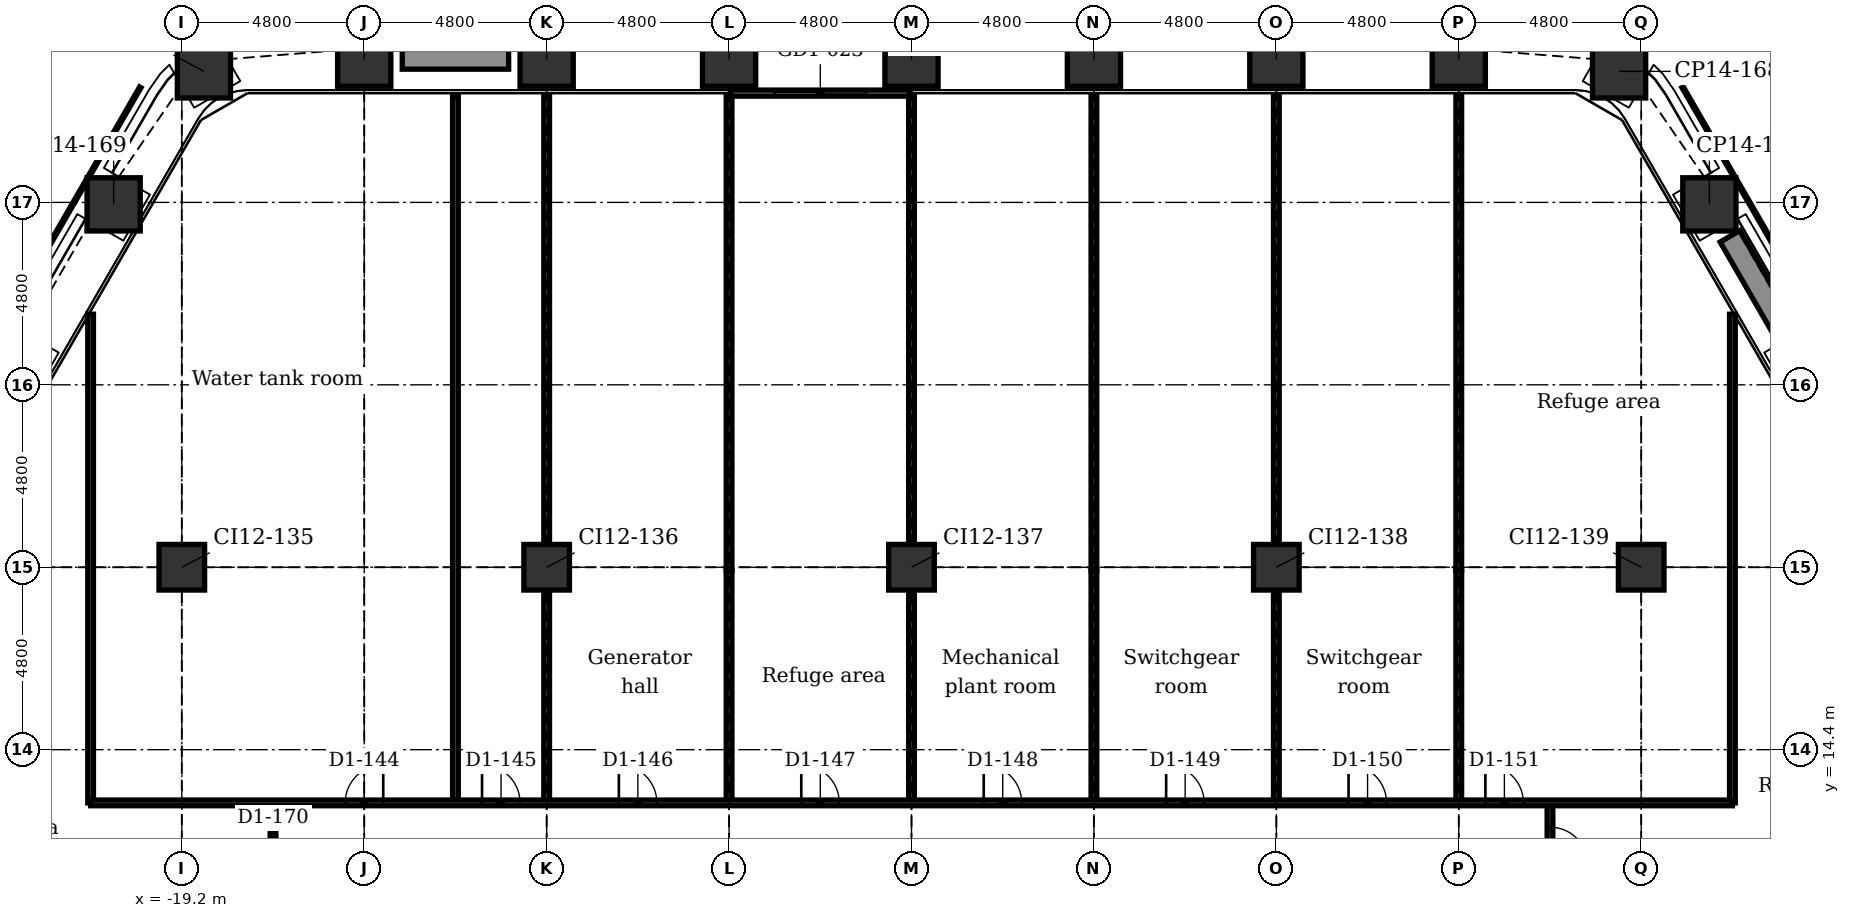
"""IFC4 building model, lengths in metres.
Left out: names, types, materials, properties, quantities, classifications, styles, units other than length and angle.
Written with IfcOpenShell. Run it as: python <this file> out.ifc"""

import sys

from ifc_helpers import new_model, si_unit, direction, frame, frame_2d, origin, origin_2d, place, context, subcontext, project, spatial, rectangle, extrude, element, fill, save


model = new_model("IFC4")
c1 = context("Model", 3, precision=1e-05, world=origin(), true_north=direction((0.0, 1.0)))
c2 = subcontext(c1, "Body", "Model", "MODEL_VIEW")
j1 = project(units=[si_unit("LENGTHUNIT", "METRE"), si_unit("PLANEANGLEUNIT", "RADIAN")], contexts=[c1])
p1 = place(None, origin())
s1 = spatial("IfcSite", under=j1, at=p1, CompositionType="ELEMENT")
p2 = place(p1, origin())
s2 = spatial("IfcBuilding", under=s1, at=p2, CompositionType="ELEMENT")
p3 = place(p2, frame((0.0, 0.0, 66.4)))
s3 = spatial("IfcBuildingStorey", under=s2, at=p3, CompositionType="ELEMENT", Elevation=66.4)
for number, where, z_axis, x_axis in (
    (1, (-18.618, 32.247, -0.3), (0.0, 0.0, 1.0), (0.866, 0.5, 0.0)),
    (2, (-14.4, 32.555, -0.3), (0.0, 0.0, 1.0), (1.0, 0.0, 0.0)),
    (3, (-9.6, 32.555, -0.3), (0.0, 0.0, 1.0), (1.0, 0.0, 0.0)),
    (4, (-4.8, 32.555, -0.3), (0.0, 0.0, 1.0), (1.0, 0.0, 0.0)),
    (5, (0.0, 32.555, -0.3), (0.0, 0.0, 1.0), (1.0, 0.0, 0.0)),
    (6, (4.8, 32.555, -0.3), (0.0, 0.0, 1.0), (1.0, 0.0, 0.0)),
    (7, (9.6, 32.555, -0.3), (0.0, 0.0, 1.0), (1.0, 0.0, 0.0)),
    (8, (14.4, 32.555, -0.3), (0.0, 0.0, 1.0), (1.0, 0.0, 0.0)),
    (9, (18.618, 32.247, -0.3), (0.0, 0.0, 1.0), (0.5, 0.866, 0.0)),
    (10, (20.994, 28.749, -0.3), (0.0, 0.0, 1.0), (0.866, 0.5, 0.0)),
    (11, (23.394, 24.592, -0.3), (0.0, 0.0, 1.0), (0.866, 0.5, 0.0)),
    (12, (-23.394, 24.592, -0.3), (0.0, 0.0, 1.0), (0.5, 0.866, 0.0)),
    (13, (-20.994, 28.749, -0.3), (0.0, 0.0, 1.0), (0.5, 0.866, 0.0)),
):
    element("IfcColumn", number, at=place(p3, frame(where, z_axis=z_axis, x_axis=x_axis)), inside=s3, PredefinedType="COLUMN", context=c2, shape_type="SweptSolid", body=[
        extrude(rectangle(XDim=1.4, YDim=1.4, at=origin_2d()), origin(), (0.0, 0.0, 1.0), 5.5),
    ])
for number, where, z_axis, x_axis in (
    (14, (-19.2, 19.2, -0.3), (0.0, 0.0, 1.0), (1.0, 0.0, 0.0)),
    (15, (-9.6, 19.2, -0.3), (0.0, 0.0, 1.0), (1.0, 0.0, 0.0)),
    (16, (0.0, 19.2, -0.3), (0.0, 0.0, 1.0), (1.0, 0.0, 0.0)),
    (17, (9.6, 19.2, -0.3), (0.0, 0.0, 1.0), (1.0, 0.0, 0.0)),
    (18, (19.2, 19.2, -0.3), (0.0, 0.0, 1.0), (1.0, 0.0, 0.0)),
):
    element("IfcColumn", number, at=place(p3, frame(where, z_axis=z_axis, x_axis=x_axis)), inside=s3, PredefinedType="COLUMN", context=c2, shape_type="SweptSolid", body=[
        extrude(rectangle(XDim=1.2, YDim=1.2, at=origin_2d()), origin(), (0.0, 0.0, 1.0), 5.5),
    ])
p4 = place(p3, frame((-4.77, 31.675, 0.0), z_axis=(0.0, 0.0, 1.0), x_axis=(1.0, 0.0, 0.0)))
e19 = element("IfcWall", 19, at=p4, inside=s3, PredefinedType="PARTITIONING", context=c2, shape_type="SweptSolid", body=[
    extrude(rectangle(XDim=4.74, YDim=0.16, at=frame_2d((2.37, 0.0))), origin(), (0.0, 0.0, 1.0), 5.2),
])
p5 = place(p4, frame((1.17, 0.0, 0.0)))
e20 = element("IfcOpeningElement", 20, at=p5, cuts=e19, PredefinedType="OPENING", context=c2, shape_type="SweptSolid", body=[
    extrude(rectangle(XDim=2.4, YDim=2.4, at=frame_2d((1.2, 1.2))), frame((0.0, 0.09, 0.0), z_axis=(0.0, -1.0, 0.0), x_axis=(1.0, 0.0, 0.0)), (0.0, 0.0, 1.0), 0.18),
])
for number, where, z_axis, x_axis in (
    (21, (-13.4, 32.605, 0.0), (0.0, 0.0, 1.0), (1.0, 0.0, 0.0)),
    (22, (21.537, 27.907, 0.0), (0.0, 0.0, 1.0), (0.5, -0.866, 0.0)),
):
    element("IfcWall", number, at=place(p3, frame(where, z_axis=z_axis, x_axis=x_axis)), inside=s3, PredefinedType="USERDEFINED", context=c2, shape_type="SweptSolid", body=[
        extrude(rectangle(XDim=2.8, YDim=0.6, at=frame_2d((1.4, 0.0))), origin(), (0.0, 0.0, 1.0), 0.7),
    ])
p6 = place(p3, frame((21.6, 13.0, 0.0), z_axis=(0.0, 0.0, 1.0), x_axis=(0.0, 1.0, 0.0)))
e23 = element("IfcWall", 23, at=p6, inside=s3, PredefinedType="PARTITIONING", context=c2, shape_type="SweptSolid", body=[
    extrude(rectangle(XDim=12.858, YDim=0.15, at=frame_2d((6.429, 0.0))), origin(), (0.0, 0.0, 1.0), 5.2),
])
p7 = place(p3, frame((16.8, 3.95, 0.0), z_axis=(0.0, 0.0, 1.0), x_axis=(0.0, 1.0, 0.0)))
e24 = element("IfcWall", 24, at=p7, inside=s3, PredefinedType="PARTITIONING", context=c2, shape_type="SweptSolid", body=[
    extrude(rectangle(XDim=9.05, YDim=0.15, at=frame_2d((4.525, 0.0))), origin(), (0.0, 0.0, 1.0), 5.2),
])
p8 = place(p7, frame((2.835, 0.0, 0.0)))
e25 = element("IfcOpeningElement", 25, at=p8, cuts=e24, PredefinedType="OPENING", context=c2, shape_type="SweptSolid", body=[
    extrude(rectangle(XDim=1.0, YDim=2.1, at=frame_2d((0.5, 1.05))), frame((0.0, 0.085, 0.0), z_axis=(0.0, -1.0, 0.0), x_axis=(1.0, 0.0, 0.0)), (0.0, 0.0, 1.0), 0.17),
])
p9 = place(p7, frame((7.41, 0.0, 0.0)))
e26 = element("IfcOpeningElement", 26, at=p9, cuts=e24, PredefinedType="OPENING", context=c2, shape_type="SweptSolid", body=[
    extrude(rectangle(XDim=1.0, YDim=2.1, at=frame_2d((0.5, 1.05))), frame((0.0, 0.085, 0.0), z_axis=(0.0, -1.0, 0.0), x_axis=(1.0, 0.0, 0.0)), (0.0, 0.0, 1.0), 0.17),
])
p10 = place(p3, frame((14.4, 19.113, 0.0), z_axis=(0.0, 0.0, 1.0), x_axis=(0.0, 1.0, 0.0)))
e27 = element("IfcWall", 27, at=p10, inside=s3, PredefinedType="PARTITIONING", context=c2, shape_type="SweptSolid", body=[
    extrude(rectangle(XDim=12.472, YDim=0.15, at=frame_2d((6.236, 0.0))), origin(), (0.0, 0.0, 1.0), 4.516),
])
p11 = place(p3, frame((14.4, 13.0, 0.0), z_axis=(0.0, 0.0, 1.0), x_axis=(0.0, 1.0, 0.0)))
e28 = element("IfcWall", 28, at=p11, inside=s3, PredefinedType="PARTITIONING", context=c2, shape_type="SweptSolid", body=[
    extrude(rectangle(XDim=6.113, YDim=0.15, at=frame_2d((3.057, 0.0))), origin(), (0.0, 0.0, 1.0), 4.743),
])
p12 = place(p3, frame((9.6, 13.0, 0.0), z_axis=(0.0, 0.0, 1.0), x_axis=(0.0, 1.0, 0.0)))
e29 = element("IfcWall", 29, at=p12, inside=s3, PredefinedType="PARTITIONING", context=c2, shape_type="SweptSolid", body=[
    extrude(rectangle(XDim=5.6, YDim=0.15, at=frame_2d((2.8, 0.0))), origin(), (0.0, 0.0, 1.0), 4.743),
])
p13 = place(p3, frame((9.6, 19.8, 0.0), z_axis=(0.0, 0.0, 1.0), x_axis=(0.0, 1.0, 0.0)))
e30 = element("IfcWall", 30, at=p13, inside=s3, PredefinedType="PARTITIONING", context=c2, shape_type="SweptSolid", body=[
    extrude(rectangle(XDim=11.785, YDim=0.15, at=frame_2d((5.893, 0.0))), origin(), (0.0, 0.0, 1.0), 4.592),
])
p14 = place(p3, frame((4.8, 19.113, 0.0), z_axis=(0.0, 0.0, 1.0), x_axis=(0.0, 1.0, 0.0)))
e31 = element("IfcWall", 31, at=p14, inside=s3, PredefinedType="PARTITIONING", context=c2, shape_type="SweptSolid", body=[
    extrude(rectangle(XDim=12.472, YDim=0.15, at=frame_2d((6.236, 0.0))), origin(), (0.0, 0.0, 1.0), 4.516),
])
p15 = place(p3, frame((4.8, 13.0, 0.0), z_axis=(0.0, 0.0, 1.0), x_axis=(0.0, 1.0, 0.0)))
e32 = element("IfcWall", 32, at=p15, inside=s3, PredefinedType="PARTITIONING", context=c2, shape_type="SweptSolid", body=[
    extrude(rectangle(XDim=6.113, YDim=0.15, at=frame_2d((3.057, 0.0))), origin(), (0.0, 0.0, 1.0), 4.743),
])
p16 = place(p3, frame((0.0, 13.0, 0.0), z_axis=(0.0, 0.0, 1.0), x_axis=(0.0, 1.0, 0.0)))
e33 = element("IfcWall", 33, at=p16, inside=s3, PredefinedType="PARTITIONING", context=c2, shape_type="SweptSolid", body=[
    extrude(rectangle(XDim=5.6, YDim=0.15, at=frame_2d((2.8, 0.0))), origin(), (0.0, 0.0, 1.0), 4.743),
])
p17 = place(p3, frame((0.0, 19.8, 0.0), z_axis=(0.0, 0.0, 1.0), x_axis=(0.0, 1.0, 0.0)))
e34 = element("IfcWall", 34, at=p17, inside=s3, PredefinedType="PARTITIONING", context=c2, shape_type="SweptSolid", body=[
    extrude(rectangle(XDim=11.795, YDim=0.15, at=frame_2d((5.898, 0.0))), origin(), (0.0, 0.0, 1.0), 4.592),
])
p18 = place(p3, frame((-4.8, 19.113, 0.0), z_axis=(0.0, 0.0, 1.0), x_axis=(0.0, 1.0, 0.0)))
e35 = element("IfcWall", 35, at=p18, inside=s3, PredefinedType="PARTITIONING", context=c2, shape_type="SweptSolid", body=[
    extrude(rectangle(XDim=12.482, YDim=0.15, at=frame_2d((6.241, 0.0))), origin(), (0.0, 0.0, 1.0), 4.516),
])
p19 = place(p3, frame((-4.8, 13.0, 0.0), z_axis=(0.0, 0.0, 1.0), x_axis=(0.0, 1.0, 0.0)))
e36 = element("IfcWall", 36, at=p19, inside=s3, PredefinedType="PARTITIONING", context=c2, shape_type="SweptSolid", body=[
    extrude(rectangle(XDim=6.113, YDim=0.15, at=frame_2d((3.057, 0.0))), origin(), (0.0, 0.0, 1.0), 4.743),
])
p20 = place(p3, frame((-9.6, 13.0, 0.0), z_axis=(0.0, 0.0, 1.0), x_axis=(0.0, 1.0, 0.0)))
e37 = element("IfcWall", 37, at=p20, inside=s3, PredefinedType="PARTITIONING", context=c2, shape_type="SweptSolid", body=[
    extrude(rectangle(XDim=5.6, YDim=0.15, at=frame_2d((2.8, 0.0))), origin(), (0.0, 0.0, 1.0), 4.743),
])
p21 = place(p3, frame((-9.6, 19.8, 0.0), z_axis=(0.0, 0.0, 1.0), x_axis=(0.0, 1.0, 0.0)))
e38 = element("IfcWall", 38, at=p21, inside=s3, PredefinedType="PARTITIONING", context=c2, shape_type="SweptSolid", body=[
    extrude(rectangle(XDim=11.785, YDim=0.15, at=frame_2d((5.893, 0.0))), origin(), (0.0, 0.0, 1.0), 4.592),
])
p22 = place(p3, frame((-12.0, 13.0, 0.0), z_axis=(0.0, 0.0, 1.0), x_axis=(0.0, 1.0, 0.0)))
e39 = element("IfcWall", 39, at=p22, inside=s3, PredefinedType="PARTITIONING", context=c2, shape_type="SweptSolid", body=[
    extrude(rectangle(XDim=18.585, YDim=0.15, at=frame_2d((9.293, 0.0))), origin(), (0.0, 0.0, 1.0), 5.2),
])
p23 = place(p3, frame((-16.8, 3.95, 0.0), z_axis=(0.0, 0.0, 1.0), x_axis=(0.0, 1.0, 0.0)))
e40 = element("IfcWall", 40, at=p23, inside=s3, PredefinedType="PARTITIONING", context=c2, shape_type="SweptSolid", body=[
    extrude(rectangle(XDim=9.05, YDim=0.15, at=frame_2d((4.525, 0.0))), origin(), (0.0, 0.0, 1.0), 5.2),
])
p24 = place(p23, frame((1.25, 0.0, 0.0)))
e41 = element("IfcOpeningElement", 41, at=p24, cuts=e40, PredefinedType="OPENING", context=c2, shape_type="SweptSolid", body=[
    extrude(rectangle(XDim=1.0, YDim=2.1, at=frame_2d((0.5, 1.05))), frame((0.0, 0.085, 0.0), z_axis=(0.0, -1.0, 0.0), x_axis=(1.0, 0.0, 0.0)), (0.0, 0.0, 1.0), 0.17),
])
p25 = place(p23, frame((4.15, 0.0, 0.0)))
e42 = element("IfcOpeningElement", 42, at=p25, cuts=e40, PredefinedType="OPENING", context=c2, shape_type="SweptSolid", body=[
    extrude(rectangle(XDim=1.0, YDim=2.1, at=frame_2d((0.5, 1.05))), frame((0.0, 0.085, 0.0), z_axis=(0.0, -1.0, 0.0), x_axis=(1.0, 0.0, 0.0)), (0.0, 0.0, 1.0), 0.17),
])
p26 = place(p23, frame((7.05, 0.0, 0.0)))
e43 = element("IfcOpeningElement", 43, at=p26, cuts=e40, PredefinedType="OPENING", context=c2, shape_type="SweptSolid", body=[
    extrude(rectangle(XDim=1.0, YDim=2.1, at=frame_2d((0.5, 1.05))), frame((0.0, 0.085, 0.0), z_axis=(0.0, -1.0, 0.0), x_axis=(1.0, 0.0, 0.0)), (0.0, 0.0, 1.0), 0.17),
])
p27 = place(p3, frame((-21.6, 13.0, 0.0), z_axis=(0.0, 0.0, 1.0), x_axis=(0.0, 1.0, 0.0)))
e44 = element("IfcWall", 44, at=p27, inside=s3, PredefinedType="PARTITIONING", context=c2, shape_type="SweptSolid", body=[
    extrude(rectangle(XDim=12.858, YDim=0.15, at=frame_2d((6.429, 0.0))), origin(), (0.0, 0.0, 1.0), 5.2),
])
p28 = place(p3, frame((-21.6, 13.0, 0.0), z_axis=(0.0, 0.0, 1.0), x_axis=(1.0, 0.0, 0.0)))
e45 = element("IfcWall", 45, at=p28, inside=s3, PredefinedType="PARTITIONING", context=c2, shape_type="SweptSolid", body=[
    extrude(rectangle(XDim=43.2, YDim=0.15, at=frame_2d((21.6, 0.0))), origin(), (0.0, 0.0, 1.0), 5.2),
])
p29 = place(p28, frame((6.7, 0.0, 0.0)))
e46 = element("IfcOpeningElement", 46, at=p29, cuts=e45, PredefinedType="OPENING", context=c2, shape_type="SweptSolid", body=[
    extrude(rectangle(XDim=1.0, YDim=2.1, at=frame_2d((0.5, 1.05))), frame((0.0, 0.085, 0.0), z_axis=(0.0, -1.0, 0.0), x_axis=(1.0, 0.0, 0.0)), (0.0, 0.0, 1.0), 0.17),
])
p30 = place(p28, frame((10.3, 0.0, 0.0)))
e47 = element("IfcOpeningElement", 47, at=p30, cuts=e45, PredefinedType="OPENING", context=c2, shape_type="SweptSolid", body=[
    extrude(rectangle(XDim=1.0, YDim=2.1, at=frame_2d((0.5, 1.05))), frame((0.0, 0.085, 0.0), z_axis=(0.0, -1.0, 0.0), x_axis=(1.0, 0.0, 0.0)), (0.0, 0.0, 1.0), 0.17),
])
p31 = place(p28, frame((13.9, 0.0, 0.0)))
e48 = element("IfcOpeningElement", 48, at=p31, cuts=e45, PredefinedType="OPENING", context=c2, shape_type="SweptSolid", body=[
    extrude(rectangle(XDim=1.0, YDim=2.1, at=frame_2d((0.5, 1.05))), frame((0.0, 0.085, 0.0), z_axis=(0.0, -1.0, 0.0), x_axis=(1.0, 0.0, 0.0)), (0.0, 0.0, 1.0), 0.17),
])
p32 = place(p28, frame((18.7, 0.0, 0.0)))
e49 = element("IfcOpeningElement", 49, at=p32, cuts=e45, PredefinedType="OPENING", context=c2, shape_type="SweptSolid", body=[
    extrude(rectangle(XDim=1.0, YDim=2.1, at=frame_2d((0.5, 1.05))), frame((0.0, 0.085, 0.0), z_axis=(0.0, -1.0, 0.0), x_axis=(1.0, 0.0, 0.0)), (0.0, 0.0, 1.0), 0.17),
])
p33 = place(p28, frame((23.5, 0.0, 0.0)))
e50 = element("IfcOpeningElement", 50, at=p33, cuts=e45, PredefinedType="OPENING", context=c2, shape_type="SweptSolid", body=[
    extrude(rectangle(XDim=1.0, YDim=2.1, at=frame_2d((0.5, 1.05))), frame((0.0, 0.085, 0.0), z_axis=(0.0, -1.0, 0.0), x_axis=(1.0, 0.0, 0.0)), (0.0, 0.0, 1.0), 0.17),
])
p34 = place(p28, frame((28.3, 0.0, 0.0)))
e51 = element("IfcOpeningElement", 51, at=p34, cuts=e45, PredefinedType="OPENING", context=c2, shape_type="SweptSolid", body=[
    extrude(rectangle(XDim=1.0, YDim=2.1, at=frame_2d((0.5, 1.05))), frame((0.0, 0.085, 0.0), z_axis=(0.0, -1.0, 0.0), x_axis=(1.0, 0.0, 0.0)), (0.0, 0.0, 1.0), 0.17),
])
p35 = place(p28, frame((33.1, 0.0, 0.0)))
e52 = element("IfcOpeningElement", 52, at=p35, cuts=e45, PredefinedType="OPENING", context=c2, shape_type="SweptSolid", body=[
    extrude(rectangle(XDim=1.0, YDim=2.1, at=frame_2d((0.5, 1.05))), frame((0.0, 0.085, 0.0), z_axis=(0.0, -1.0, 0.0), x_axis=(1.0, 0.0, 0.0)), (0.0, 0.0, 1.0), 0.17),
])
p36 = place(p28, frame((36.7, 0.0, 0.0)))
e53 = element("IfcOpeningElement", 53, at=p36, cuts=e45, PredefinedType="OPENING", context=c2, shape_type="SweptSolid", body=[
    extrude(rectangle(XDim=1.0, YDim=2.1, at=frame_2d((0.5, 1.05))), frame((0.0, 0.085, 0.0), z_axis=(0.0, -1.0, 0.0), x_axis=(1.0, 0.0, 0.0)), (0.0, 0.0, 1.0), 0.17),
])
p37 = place(p5, origin())
e54 = element("IfcDoor", 54, at=p37, inside=s3, OperationType="DOUBLE_DOOR_SLIDING", PredefinedType="DOOR", context=c2, shape_type="SweptSolid", body=[
    extrude(rectangle(XDim=2.4, YDim=2.4, at=frame_2d((1.2, 1.2))), frame((0.0, 0.025, 0.0), z_axis=(0.0, -1.0, 0.0), x_axis=(1.0, 0.0, 0.0)), (0.0, 0.0, 1.0), 0.05),
])
fill(e20, e54)
p38 = place(p29, origin())
e55 = element("IfcDoor", 55, at=p38, inside=s3, OperationType="SINGLE_SWING_RIGHT", PredefinedType="DOOR", context=c2, shape_type="SweptSolid", body=[
    extrude(rectangle(XDim=1.0, YDim=2.1, at=frame_2d((0.5, 1.05))), frame((0.0, 0.025, 0.0), z_axis=(0.0, -1.0, 0.0), x_axis=(1.0, 0.0, 0.0)), (0.0, 0.0, 1.0), 0.05),
])
fill(e46, e55)
p39 = place(p30, origin())
e56 = element("IfcDoor", 56, at=p39, inside=s3, OperationType="SINGLE_SWING_LEFT", PredefinedType="DOOR", context=c2, shape_type="SweptSolid", body=[
    extrude(rectangle(XDim=1.0, YDim=2.1, at=frame_2d((0.5, 1.05))), frame((0.0, 0.025, 0.0), z_axis=(0.0, -1.0, 0.0), x_axis=(1.0, 0.0, 0.0)), (0.0, 0.0, 1.0), 0.05),
])
fill(e47, e56)
p40 = place(p31, origin())
e57 = element("IfcDoor", 57, at=p40, inside=s3, OperationType="SINGLE_SWING_LEFT", PredefinedType="DOOR", context=c2, shape_type="SweptSolid", body=[
    extrude(rectangle(XDim=1.0, YDim=2.1, at=frame_2d((0.5, 1.05))), frame((0.0, 0.025, 0.0), z_axis=(0.0, -1.0, 0.0), x_axis=(1.0, 0.0, 0.0)), (0.0, 0.0, 1.0), 0.05),
])
fill(e48, e57)
p41 = place(p32, origin())
e58 = element("IfcDoor", 58, at=p41, inside=s3, OperationType="SINGLE_SWING_LEFT", PredefinedType="DOOR", context=c2, shape_type="SweptSolid", body=[
    extrude(rectangle(XDim=1.0, YDim=2.1, at=frame_2d((0.5, 1.05))), frame((0.0, 0.025, 0.0), z_axis=(0.0, -1.0, 0.0), x_axis=(1.0, 0.0, 0.0)), (0.0, 0.0, 1.0), 0.05),
])
fill(e49, e58)
p42 = place(p33, origin())
e59 = element("IfcDoor", 59, at=p42, inside=s3, OperationType="SINGLE_SWING_LEFT", PredefinedType="DOOR", context=c2, shape_type="SweptSolid", body=[
    extrude(rectangle(XDim=1.0, YDim=2.1, at=frame_2d((0.5, 1.05))), frame((0.0, 0.025, 0.0), z_axis=(0.0, -1.0, 0.0), x_axis=(1.0, 0.0, 0.0)), (0.0, 0.0, 1.0), 0.05),
])
fill(e50, e59)
p43 = place(p34, origin())
e60 = element("IfcDoor", 60, at=p43, inside=s3, OperationType="SINGLE_SWING_LEFT", PredefinedType="DOOR", context=c2, shape_type="SweptSolid", body=[
    extrude(rectangle(XDim=1.0, YDim=2.1, at=frame_2d((0.5, 1.05))), frame((0.0, 0.025, 0.0), z_axis=(0.0, -1.0, 0.0), x_axis=(1.0, 0.0, 0.0)), (0.0, 0.0, 1.0), 0.05),
])
fill(e51, e60)
p44 = place(p35, origin())
e61 = element("IfcDoor", 61, at=p44, inside=s3, OperationType="SINGLE_SWING_LEFT", PredefinedType="DOOR", context=c2, shape_type="SweptSolid", body=[
    extrude(rectangle(XDim=1.0, YDim=2.1, at=frame_2d((0.5, 1.05))), frame((0.0, 0.025, 0.0), z_axis=(0.0, -1.0, 0.0), x_axis=(1.0, 0.0, 0.0)), (0.0, 0.0, 1.0), 0.05),
])
fill(e52, e61)
p45 = place(p36, origin())
e62 = element("IfcDoor", 62, at=p45, inside=s3, OperationType="SINGLE_SWING_LEFT", PredefinedType="DOOR", context=c2, shape_type="SweptSolid", body=[
    extrude(rectangle(XDim=1.0, YDim=2.1, at=frame_2d((0.5, 1.05))), frame((0.0, 0.025, 0.0), z_axis=(0.0, -1.0, 0.0), x_axis=(1.0, 0.0, 0.0)), (0.0, 0.0, 1.0), 0.05),
])
fill(e53, e62)
p46 = place(p9, frame((1.0, 0.0, 0.0), z_axis=(0.0, 0.0, 1.0), x_axis=(-1.0, 0.0, 0.0)))
e63 = element("IfcDoor", 63, at=p46, inside=s3, OperationType="SINGLE_SWING_LEFT", PredefinedType="DOOR", context=c2, shape_type="SweptSolid", body=[
    extrude(rectangle(XDim=1.0, YDim=2.1, at=frame_2d((0.5, 1.05))), frame((0.0, 0.025, 0.0), z_axis=(0.0, -1.0, 0.0), x_axis=(1.0, 0.0, 0.0)), (0.0, 0.0, 1.0), 0.05),
])
fill(e26, e63)
save(model, sys.argv[1])
